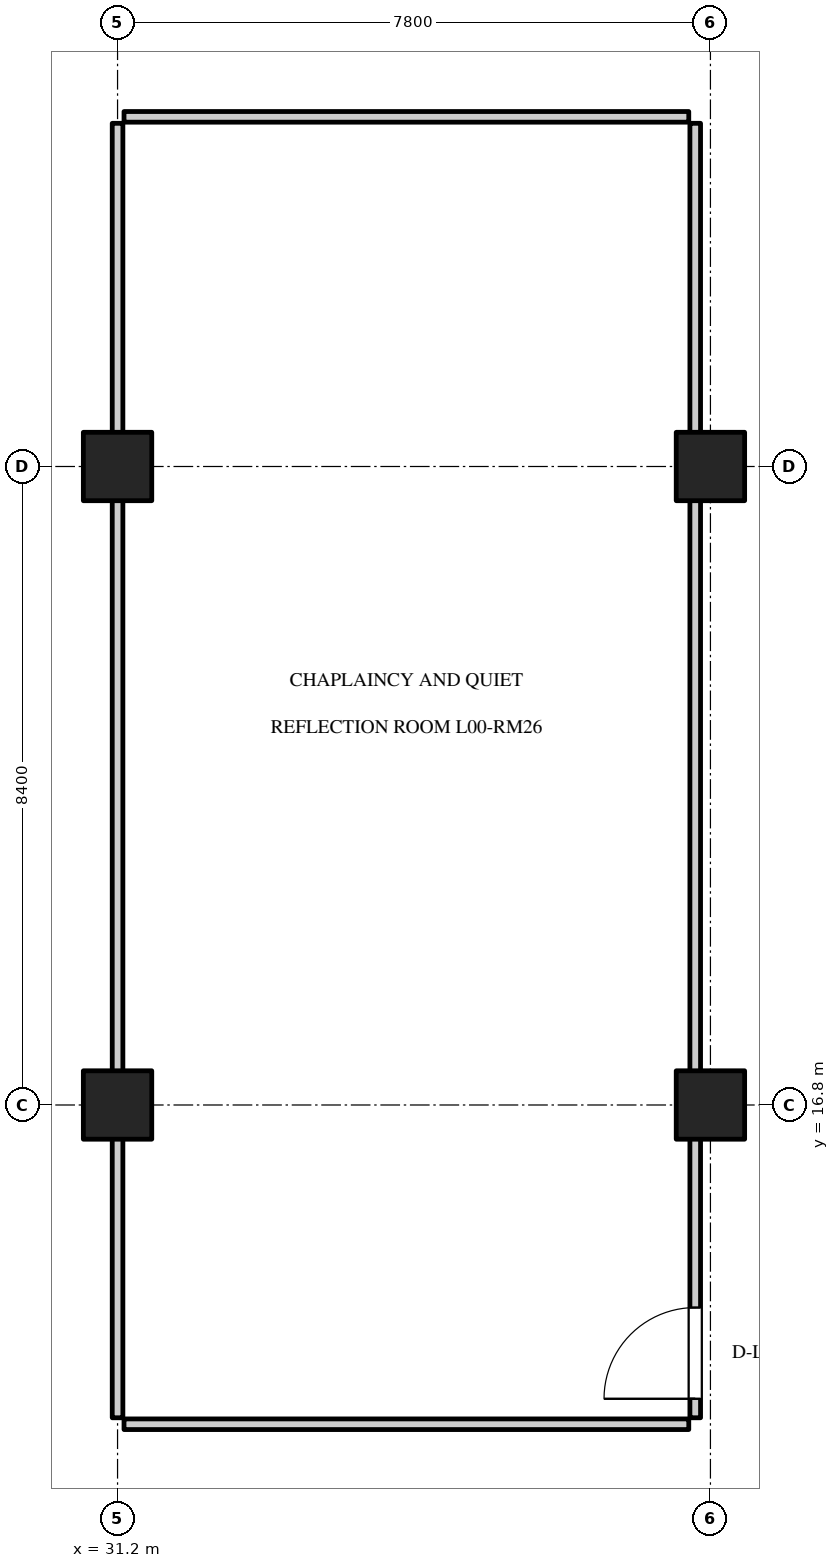
"""IFC4 building model, lengths in metres.
Left out: names, types, materials, properties, quantities, classifications, styles, units other than length and angle.
Written with IfcOpenShell. Run it as: python <this file> out.ifc"""

import sys

from ifc_helpers import new_model, si_unit, direction, frame, frame_2d, origin, origin_2d, place, context, subcontext, project, spatial, rectangle, extrude, element, fill, save


model = new_model("IFC4")
c1 = context("Model", 3, precision=1e-05, world=origin(), true_north=direction((0.0, 1.0)))
c2 = subcontext(c1, "Body", "Model", "MODEL_VIEW")
j1 = project(units=[si_unit("LENGTHUNIT", "METRE"), si_unit("PLANEANGLEUNIT", "RADIAN")], contexts=[c1])
p1 = place(None, origin())
s1 = spatial("IfcSite", under=j1, at=p1, CompositionType="ELEMENT")
p2 = place(p1, origin())
s2 = spatial("IfcBuilding", under=s1, at=p2, CompositionType="ELEMENT")
p3 = place(p2, origin())
s3 = spatial("IfcBuildingStorey", under=s2, at=p3, CompositionType="ELEMENT", Elevation=0.0)
for number, where, z_axis, x_axis in (
    (1, (31.2, 16.8, 0.0), (0.0, 0.0, 1.0), (1.0, 0.0, 0.0)),
    (2, (31.2, 25.2, 0.0), (0.0, 0.0, 1.0), (1.0, 0.0, 0.0)),
    (3, (39.0, 16.8, 0.0), (0.0, 0.0, 1.0), (1.0, 0.0, 0.0)),
    (4, (39.0, 25.2, 0.0), (0.0, 0.0, 1.0), (1.0, 0.0, 0.0)),
):
    element("IfcColumn", number, at=place(p3, frame(where, z_axis=z_axis, x_axis=x_axis)), inside=s3, PredefinedType="COLUMN", context=c2, shape_type="SweptSolid", body=[
        extrude(rectangle(XDim=0.9, YDim=0.9, at=origin_2d()), origin(), (0.0, 0.0, 1.0), 4.8),
    ])
p4 = place(p3, frame((38.8, 12.685, 0.0), z_axis=(0.0, 0.0, 1.0), x_axis=(0.0, 1.0, 0.0)))
e5 = element("IfcWall", 5, at=p4, inside=s3, PredefinedType="PARTITIONING", context=c2, shape_type="SweptSolid", body=[
    extrude(rectangle(XDim=17.03, YDim=0.14, at=frame_2d((8.515, 0.0))), origin(), (0.0, 0.0, 1.0), 3.7),
])
p5 = place(p4, frame((0.25, 0.0, 0.0)))
e6 = element("IfcOpeningElement", 6, at=p5, cuts=e5, PredefinedType="OPENING", context=c2, shape_type="SweptSolid", body=[
    extrude(rectangle(XDim=1.2, YDim=2.15, at=frame_2d((0.6, 1.075))), frame((0.0, 0.082, 0.0), z_axis=(0.0, -1.0, 0.0), x_axis=(1.0, 0.0, 0.0)), (0.0, 0.0, 1.0), 0.164),
])
for number, where, z_axis, x_axis in (
    (7, (31.285, 12.6, 0.0), (0.0, 0.0, 1.0), (1.0, 0.0, 0.0)),
    (8, (31.285, 29.8, 0.0), (0.0, 0.0, 1.0), (1.0, 0.0, 0.0)),
):
    element("IfcWall", number, at=place(p3, frame(where, z_axis=z_axis, x_axis=x_axis)), inside=s3, PredefinedType="PARTITIONING", context=c2, shape_type="SweptSolid", body=[
        extrude(rectangle(XDim=7.43, YDim=0.14, at=frame_2d((3.715, 0.0))), origin(), (0.0, 0.0, 1.0), 4.43),
    ])
p6 = place(p3, frame((31.2, 12.685, 0.0), z_axis=(0.0, 0.0, 1.0), x_axis=(0.0, 1.0, 0.0)))
e9 = element("IfcWall", 9, at=p6, inside=s3, PredefinedType="PARTITIONING", context=c2, shape_type="SweptSolid", body=[
    extrude(rectangle(XDim=17.03, YDim=0.14, at=frame_2d((8.515, 0.0))), origin(), (0.0, 0.0, 1.0), 4.43),
])
p7 = place(p5, origin())
e10 = element("IfcDoor", 10, at=p7, inside=s3, OperationType="SINGLE_SWING_LEFT", PredefinedType="DOOR", context=c2, shape_type="SweptSolid", body=[
    extrude(rectangle(XDim=1.2, YDim=2.15, at=frame_2d((0.6, 1.075))), frame((0.0, 0.025, 0.0), z_axis=(0.0, -1.0, 0.0), x_axis=(1.0, 0.0, 0.0)), (0.0, 0.0, 1.0), 0.05),
])
fill(e6, e10)
save(model, sys.argv[1])
